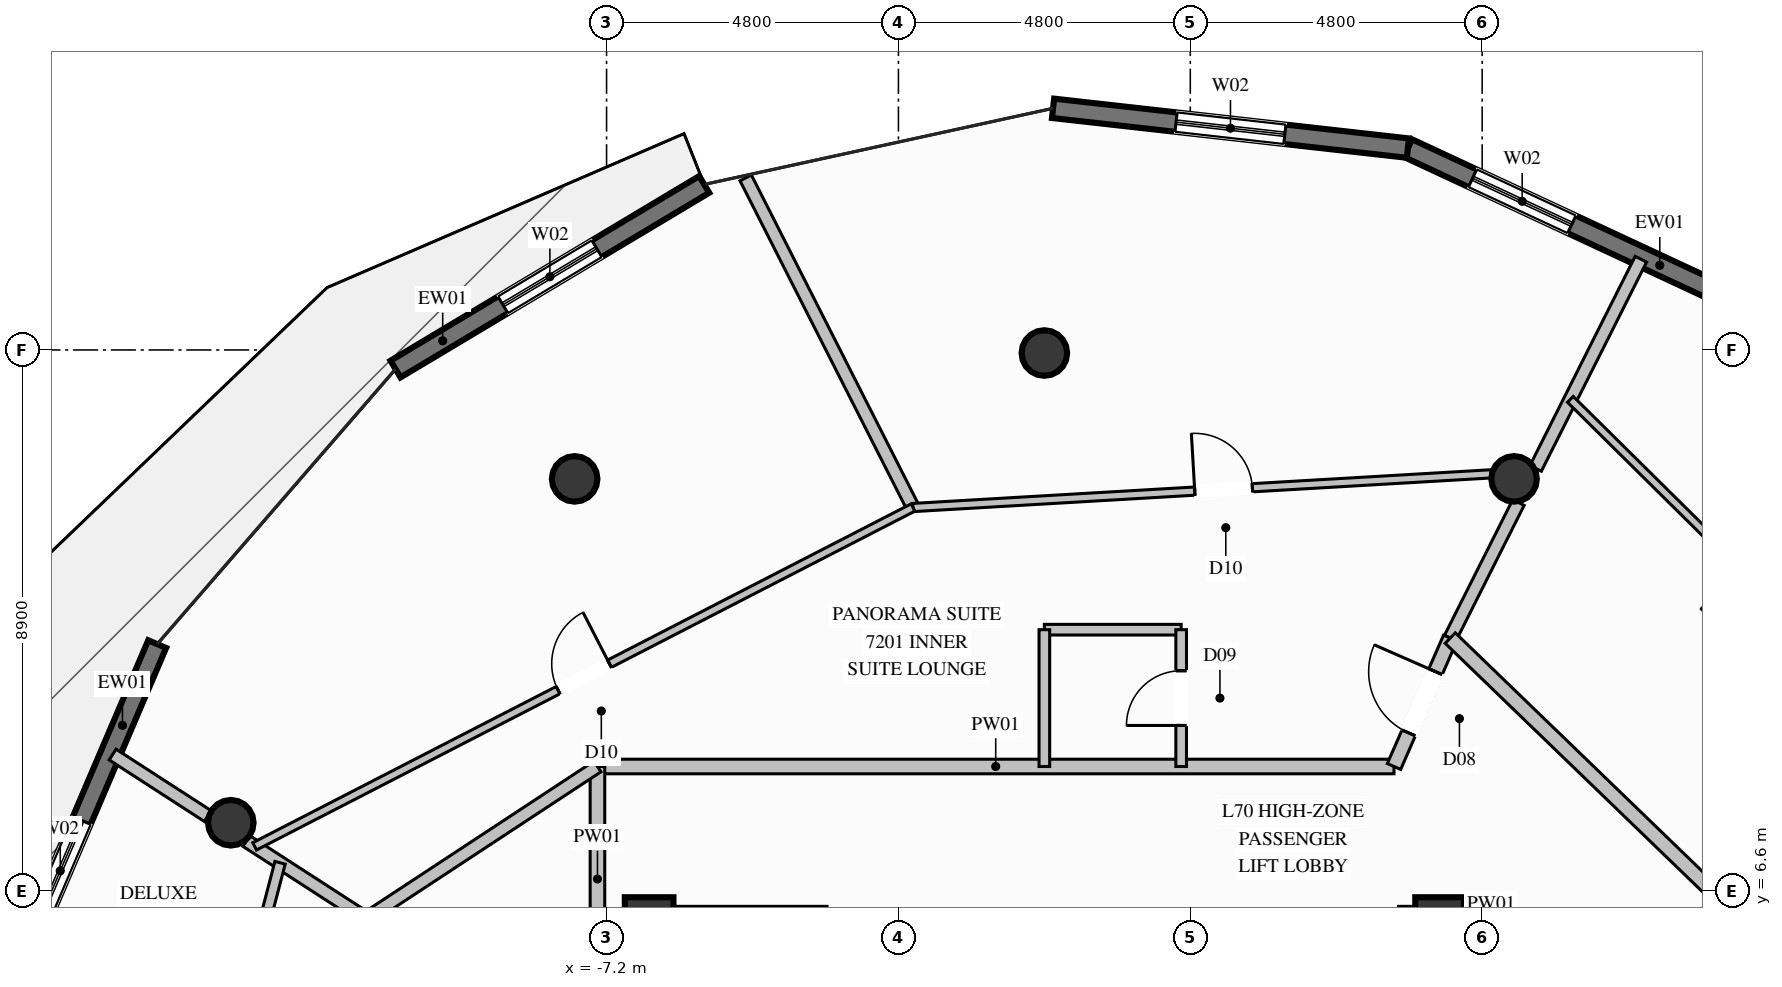
"""IFC4 building model, lengths in metres.
Left out: names, types, materials, properties, quantities, classifications, styles, units other than length and angle.
Written with IfcOpenShell. Run it as: python <this file> out.ifc"""

import sys

from ifc_helpers import new_model, si_unit, direction, frame, frame_2d, origin, origin_2d, place, context, subcontext, project, spatial, rectangle, circle, extrude, element, fill, save


model = new_model("IFC4")
c1 = context("Model", 3, precision=1e-05, world=origin(), true_north=direction((0.0, 1.0)))
c2 = subcontext(c1, "Body", "Model", "MODEL_VIEW")
j1 = project(units=[si_unit("LENGTHUNIT", "METRE"), si_unit("PLANEANGLEUNIT", "RADIAN")], contexts=[c1])
p1 = place(None, origin())
s1 = spatial("IfcSite", under=j1, at=p1, CompositionType="ELEMENT")
p2 = place(p1, origin())
s2 = spatial("IfcBuilding", under=s1, at=p2, CompositionType="ELEMENT")
p3 = place(p2, frame((0.0, 0.0, 270.6)))
s3 = spatial("IfcBuildingStorey", under=s2, at=p3, CompositionType="ELEMENT", Elevation=270.6)
for number, where, z_axis, x_axis in (
    (1, (6.5, 6.1, 0.0), (0.0, 0.0, 1.0), (1.0, 0.0, 0.0)),
    (2, (-6.5, 6.1, 0.0), (0.0, 0.0, 1.0), (1.0, 0.0, 0.0)),
):
    element("IfcColumn", number, at=place(p3, frame(where, z_axis=z_axis, x_axis=x_axis)), inside=s3, PredefinedType="COLUMN", context=c2, shape_type="SweptSolid", body=[
        extrude(rectangle(XDim=0.8, YDim=0.8, at=origin_2d()), origin(), (0.0, 0.0, 1.0), 3.8),
    ])
for number, where, z_axis, x_axis in (
    (3, (7.725, 13.38, 0.0), (0.0, 0.0, 1.0), (1.0, 0.0, 0.0)),
    (4, (0.0, 15.45, 0.0), (0.0, 0.0, 1.0), (1.0, 0.0, 0.0)),
    (5, (-7.725, 13.38, 0.0), (0.0, 0.0, 1.0), (1.0, 0.0, 0.0)),
    (6, (-13.38, 7.725, 0.0), (0.0, 0.0, 1.0), (1.0, 0.0, 0.0)),
):
    element("IfcColumn", number, at=place(p3, frame(where, z_axis=z_axis, x_axis=x_axis)), inside=s3, PredefinedType="COLUMN", context=c2, shape_type="SweptSolid", body=[
        extrude(circle(Radius=0.375, at=origin_2d()), origin(), (0.0, 0.0, 1.0), 3.8),
    ])
p4 = place(p3, frame((5.979, 18.82, 0.0), z_axis=(0.0, 0.0, 1.0), x_axis=(0.90661391217, -0.421961152548, 0.0)))
e7 = element("IfcWall", 7, at=p4, inside=s3, PredefinedType="SOLIDWALL", context=c2, shape_type="SweptSolid", body=[
    extrude(rectangle(XDim=5.916, YDim=0.32, at=frame_2d((2.958, 0.0))), origin(), (0.0, 0.0, 1.0), 3.57),
])
p5 = place(p4, frame((1.173, 0.0, 0.35)))
e8 = element("IfcOpeningElement", 8, at=p5, cuts=e7, PredefinedType="OPENING", context=c2, shape_type="SweptSolid", body=[
    extrude(rectangle(XDim=1.8, YDim=2.6, at=frame_2d((0.9, 1.3))), frame((0.0, 0.17, 0.0), z_axis=(0.0, -1.0, 0.0), x_axis=(1.0, 0.0, 0.0)), (0.0, 0.0, 1.0), 0.34),
])
p6 = place(p3, frame((0.143, 19.474, 0.0), z_axis=(0.0, 0.0, 1.0), x_axis=(0.993778337548, -0.111376010973, 0.0)))
e9 = element("IfcWall", 9, at=p6, inside=s3, PredefinedType="SOLIDWALL", context=c2, shape_type="SweptSolid", body=[
    extrude(rectangle(XDim=5.873, YDim=0.32, at=frame_2d((2.936, 0.0))), origin(), (0.0, 0.0, 1.0), 3.57),
])
p7 = place(p6, frame((2.036, 0.0, 0.35)))
e10 = element("IfcOpeningElement", 10, at=p7, cuts=e9, PredefinedType="OPENING", context=c2, shape_type="SweptSolid", body=[
    extrude(rectangle(XDim=1.8, YDim=2.6, at=frame_2d((0.9, 1.3))), frame((0.0, 0.17, 0.0), z_axis=(0.0, -1.0, 0.0), x_axis=(1.0, 0.0, 0.0)), (0.0, 0.0, 1.0), 0.34),
])
p8 = place(p3, frame((-10.671, 15.186, 0.0), z_axis=(0.0, 0.0, 1.0), x_axis=(0.858256729209, 0.513220602439, 0.0)))
e11 = element("IfcWall", 11, at=p8, inside=s3, PredefinedType="SOLIDWALL", context=c2, shape_type="SweptSolid", body=[
    extrude(rectangle(XDim=5.915, YDim=0.32, at=frame_2d((2.958, 0.0))), origin(), (0.0, 0.0, 1.0), 3.57),
])
p9 = place(p8, frame((2.058, 0.0, 0.35)))
e12 = element("IfcOpeningElement", 12, at=p9, cuts=e11, PredefinedType="OPENING", context=c2, shape_type="SweptSolid", body=[
    extrude(rectangle(XDim=1.8, YDim=2.6, at=frame_2d((0.9, 1.3))), frame((0.0, 0.17, 0.0), z_axis=(0.0, -1.0, 0.0), x_axis=(1.0, 0.0, 0.0)), (0.0, 0.0, 1.0), 0.34),
])
p10 = place(p3, frame((-16.97, 5.097, 0.0), z_axis=(0.0, 0.0, 1.0), x_axis=(0.392999104836, 0.919538853773, 0.0)))
e13 = element("IfcWall", 13, at=p10, inside=s3, PredefinedType="SOLIDWALL", context=c2, shape_type="SweptSolid", body=[
    extrude(rectangle(XDim=6.053, YDim=0.32, at=frame_2d((3.027, 0.0))), origin(), (0.0, 0.0, 1.0), 3.57),
])
p11 = place(p10, frame((1.098, 0.0, 0.35)))
e14 = element("IfcOpeningElement", 14, at=p11, cuts=e13, PredefinedType="OPENING", context=c2, shape_type="SweptSolid", body=[
    extrude(rectangle(XDim=1.8, YDim=2.6, at=frame_2d((0.9, 1.3))), frame((0.0, 0.17, 0.0), z_axis=(0.0, -1.0, 0.0), x_axis=(1.0, 0.0, 0.0)), (0.0, 0.0, 1.0), 0.34),
])
p12 = place(p3, frame((-7.35, 8.65, 0.0), z_axis=(0.0, 0.0, 1.0), x_axis=(1.0, 0.0, 0.0)))
e15 = element("IfcWall", 15, at=p12, inside=s3, PredefinedType="PARTITIONING", context=c2, shape_type="SweptSolid", body=[
    extrude(rectangle(XDim=13.1, YDim=0.24, at=frame_2d((6.55, 0.0))), origin(), (0.0, 0.0, 1.0), 3.57),
])
p13 = place(p3, frame((-7.35, 4.95, 0.0), z_axis=(0.0, 0.0, 1.0), x_axis=(0.0, 1.0, 0.0)))
e16 = element("IfcWall", 16, at=p13, inside=s3, PredefinedType="PARTITIONING", context=c2, shape_type="SweptSolid", body=[
    extrude(rectangle(XDim=3.7, YDim=0.24, at=frame_2d((1.85, 0.0))), origin(), (0.0, 0.0, 1.0), 2.655),
])
p14 = place(p3, frame((6.675, 10.762, 0.0), z_axis=(0.0, 0.0, 1.0), x_axis=(0.449481077606, 0.893289852665, 0.0)))
e17 = element("IfcWall", 17, at=p14, inside=s3, PredefinedType="PARTITIONING", context=c2, shape_type="SweptSolid", body=[
    extrude(rectangle(XDim=2.496, YDim=0.21, at=frame_2d((1.248, 0.0))), origin(), (0.0, 0.0, 1.0), 3.011),
])
p15 = place(p3, frame((8.08, 13.553, 0.0), z_axis=(0.0, 0.0, 1.0), x_axis=(0.449494481026, 0.893283108274, 0.0)))
e18 = element("IfcWall", 18, at=p15, inside=s3, PredefinedType="PARTITIONING", context=c2, shape_type="SweptSolid", body=[
    extrude(rectangle(XDim=3.851, YDim=0.21, at=frame_2d((1.925, 0.0))), origin(), (0.0, 0.0, 1.0), 3.57),
])
p16 = place(p3, frame((-11.152, 6.15, 0.0), z_axis=(0.0, 0.0, 1.0), x_axis=(-0.83972632371, 0.54300985375, 0.0)))
e19 = element("IfcWall", 19, at=p16, inside=s3, PredefinedType="PARTITIONING", context=c2, shape_type="SweptSolid", body=[
    extrude(rectangle(XDim=2.348, YDim=0.21, at=frame_2d((1.174, 0.0))), origin(), (0.0, 0.0, 1.0), 3.011),
])
p17 = place(p3, frame((-13.759, 7.835, 0.0), z_axis=(0.0, 0.0, 1.0), x_axis=(-0.83972828355, 0.543006822982, 0.0)))
e20 = element("IfcWall", 20, at=p17, inside=s3, PredefinedType="PARTITIONING", context=c2, shape_type="SweptSolid", body=[
    extrude(rectangle(XDim=1.864, YDim=0.21, at=frame_2d((0.932, 0.0))), origin(), (0.0, 0.0, 1.0), 3.57),
])
for number, where, z_axis, x_axis in (
    (21, (0.0, 10.9, 0.0), (0.0, 0.0, 1.0), (1.0, 0.0, 0.0)),
    (22, (0.0, 10.9, 0.0), (0.0, 0.0, 1.0), (0.0, -1.0, 0.0)),
):
    element("IfcWall", number, at=place(p3, frame(where, z_axis=z_axis, x_axis=x_axis)), inside=s3, PredefinedType="PLUMBINGWALL", context=c2, shape_type="SweptSolid", body=[
        extrude(rectangle(XDim=2.25, YDim=0.175, at=frame_2d((1.125, 0.0))), origin(), (0.0, 0.0, 1.0), 3.57),
    ])
p18 = place(p3, frame((2.25, 8.65, 0.0), z_axis=(0.0, 0.0, 1.0), x_axis=(0.0, 1.0, 0.0)))
e23 = element("IfcWall", 23, at=p18, inside=s3, PredefinedType="PLUMBINGWALL", context=c2, shape_type="SweptSolid", body=[
    extrude(rectangle(XDim=2.25, YDim=0.175, at=frame_2d((1.125, 0.0))), origin(), (0.0, 0.0, 1.0), 3.57),
])
p19 = place(p18, frame((0.675, 0.0, 0.0)))
e24 = element("IfcOpeningElement", 24, at=p19, cuts=e23, PredefinedType="OPENING", context=c2, shape_type="SweptSolid", body=[
    extrude(rectangle(XDim=0.9, YDim=2.1, at=frame_2d((0.45, 1.05))), frame((0.0, 0.098, 0.0), z_axis=(0.0, -1.0, 0.0), x_axis=(1.0, 0.0, 0.0)), (0.0, 0.0, 1.0), 0.195),
])
p20 = place(p3, frame((-11.152, 6.15, 0.0), z_axis=(0.0, 0.0, 1.0), x_axis=(0.835549960432, 0.549414473437, 0.0)))
e25 = element("IfcWall", 25, at=p20, inside=s3, PredefinedType="PARTITIONING", context=c2, shape_type="SweptSolid", body=[
    extrude(rectangle(XDim=4.55, YDim=0.21, at=frame_2d((2.275, 0.0))), origin(), (0.0, 0.0, 1.0), 3.57),
])
p21 = place(p3, frame((5.75, 8.65, 0.0), z_axis=(0.0, 0.0, 1.0), x_axis=(0.401190953907, 0.915994442398, 0.0)))
e26 = element("IfcWall", 26, at=p21, inside=s3, PredefinedType="PARTITIONING", context=c2, shape_type="SweptSolid", body=[
    extrude(rectangle(XDim=2.306, YDim=0.24, at=frame_2d((1.153, 0.0))), origin(), (0.0, 0.0, 1.0), 3.011),
])
p22 = place(p21, frame((0.603, 0.0, 0.0)))
e27 = element("IfcOpeningElement", 27, at=p22, cuts=e26, PredefinedType="OPENING", context=c2, shape_type="SweptSolid", body=[
    extrude(rectangle(XDim=1.1, YDim=2.3, at=frame_2d((0.55, 1.15))), frame((0.0, 0.13, 0.0), z_axis=(0.0, -1.0, 0.0), x_axis=(1.0, 0.0, 0.0)), (0.0, 0.0, 1.0), 0.26),
])
p23 = place(p3, frame((-2.161, 12.909, 0.0), z_axis=(0.0, 0.0, 1.0), x_axis=(-0.452554812293, 0.891736587715, 0.0)))
e28 = element("IfcWall", 28, at=p23, inside=s3, PredefinedType="PARTITIONING", context=c2, shape_type="SweptSolid", body=[
    extrude(rectangle(XDim=6.079, YDim=0.21, at=frame_2d((3.04, 0.0))), origin(), (0.0, 0.0, 1.0), 3.57),
])
p24 = place(p3, frame((-2.161, 12.909, 0.0), z_axis=(0.0, 0.0, 1.0), x_axis=(0.998308345871, 0.05814160785, 0.0)))
e29 = element("IfcWall", 29, at=p24, inside=s3, PredefinedType="PARTITIONING", context=c2, shape_type="SweptSolid", body=[
    extrude(rectangle(XDim=10.233, YDim=0.135, at=frame_2d((5.117, 0.0))), origin(), (0.0, 0.0, 1.0), 3.138),
])
p25 = place(p24, frame((4.642, 0.0, 0.0)))
e30 = element("IfcOpeningElement", 30, at=p25, cuts=e29, PredefinedType="OPENING", context=c2, shape_type="SweptSolid", body=[
    extrude(rectangle(XDim=0.95, YDim=2.1, at=frame_2d((0.475, 1.05))), frame((0.0, 0.078, 0.0), z_axis=(0.0, -1.0, 0.0), x_axis=(1.0, 0.0, 0.0)), (0.0, 0.0, 1.0), 0.155),
])
p26 = place(p3, frame((-12.988, 7.337, 0.0), z_axis=(0.0, 0.0, 1.0), x_axis=(0.889161723705, 0.457593082441, 0.0)))
e31 = element("IfcWall", 31, at=p26, inside=s3, PredefinedType="PARTITIONING", context=c2, shape_type="SweptSolid", body=[
    extrude(rectangle(XDim=12.177, YDim=0.135, at=frame_2d((6.088, 0.0))), origin(), (0.0, 0.0, 1.0), 3.138),
])
p27 = place(p26, frame((5.613, 0.0, 0.0)))
e32 = element("IfcOpeningElement", 32, at=p27, cuts=e31, PredefinedType="OPENING", context=c2, shape_type="SweptSolid", body=[
    extrude(rectangle(XDim=0.95, YDim=2.1, at=frame_2d((0.475, 1.05))), frame((0.0, 0.078, 0.0), z_axis=(0.0, -1.0, 0.0), x_axis=(1.0, 0.0, 0.0)), (0.0, 0.0, 1.0), 0.155),
])
p28 = place(p3, frame((-12.57, 7.067, 0.0), z_axis=(0.0, 0.0, 1.0), x_axis=(-0.25291700501, -0.967487978518, 0.0)))
e33 = element("IfcWall", 33, at=p28, inside=s3, PredefinedType="PLUMBINGWALL", context=c2, shape_type="SweptSolid", body=[
    extrude(rectangle(XDim=3.111, YDim=0.175, at=frame_2d((1.556, 0.0))), origin(), (0.0, 0.0, 1.0), 3.57),
])
p29 = place(p3, frame((11.452, 6.15, 0.0), z_axis=(0.0, 0.0, 1.0), x_axis=(-0.719407162497, 0.694588608133, 0.0)))
e34 = element("IfcWall", 34, at=p29, inside=s3, PredefinedType="PARTITIONING", context=c2, shape_type="SweptSolid", body=[
    extrude(rectangle(XDim=6.64, YDim=0.24, at=frame_2d((3.32, 0.0))), origin(), (0.0, 0.0, 1.0), 3.57),
])
p30 = place(p3, frame((14.948, 8.46, 0.0), z_axis=(0.0, 0.0, 1.0), x_axis=(-0.710996539207, 0.703195507121, 0.0)))
e35 = element("IfcWall", 35, at=p30, inside=s3, PredefinedType="PARTITIONING", context=c2, shape_type="SweptSolid", body=[
    extrude(rectangle(XDim=8.857, YDim=0.135, at=frame_2d((4.428, 0.0))), origin(), (0.0, 0.0, 1.0), 3.57),
])
p31 = place(p30, frame((3.953, 0.0, 0.0)))
e36 = element("IfcOpeningElement", 36, at=p31, cuts=e35, PredefinedType="OPENING", context=c2, shape_type="SweptSolid", body=[
    extrude(rectangle(XDim=0.95, YDim=2.1, at=frame_2d((0.475, 1.05))), frame((0.0, 0.078, 0.0), z_axis=(0.0, -1.0, 0.0), x_axis=(1.0, 0.0, 0.0)), (0.0, 0.0, 1.0), 0.155),
])
p32 = place(p5, origin())
e37 = element("IfcWindow", 37, at=p32, inside=s3, PartitioningType="SINGLE_PANEL", PredefinedType="WINDOW", context=c2, shape_type="SweptSolid", body=[
    extrude(rectangle(XDim=1.8, YDim=2.6, at=frame_2d((0.9, 1.3))), frame((0.0, 0.03, 0.0), z_axis=(0.0, -1.0, 0.0), x_axis=(1.0, 0.0, 0.0)), (0.0, 0.0, 1.0), 0.06),
])
fill(e8, e37)
p33 = place(p7, origin())
e38 = element("IfcWindow", 38, at=p33, inside=s3, PartitioningType="SINGLE_PANEL", PredefinedType="WINDOW", context=c2, shape_type="SweptSolid", body=[
    extrude(rectangle(XDim=1.8, YDim=2.6, at=frame_2d((0.9, 1.3))), frame((0.0, 0.03, 0.0), z_axis=(0.0, -1.0, 0.0), x_axis=(1.0, 0.0, 0.0)), (0.0, 0.0, 1.0), 0.06),
])
fill(e10, e38)
p34 = place(p9, origin())
e39 = element("IfcWindow", 39, at=p34, inside=s3, PartitioningType="SINGLE_PANEL", PredefinedType="WINDOW", context=c2, shape_type="SweptSolid", body=[
    extrude(rectangle(XDim=1.8, YDim=2.6, at=frame_2d((0.9, 1.3))), frame((0.0, 0.03, 0.0), z_axis=(0.0, -1.0, 0.0), x_axis=(1.0, 0.0, 0.0)), (0.0, 0.0, 1.0), 0.06),
])
fill(e12, e39)
p35 = place(p11, origin())
e40 = element("IfcWindow", 40, at=p35, inside=s3, PartitioningType="SINGLE_PANEL", PredefinedType="WINDOW", context=c2, shape_type="SweptSolid", body=[
    extrude(rectangle(XDim=1.8, YDim=2.6, at=frame_2d((0.9, 1.3))), frame((0.0, 0.03, 0.0), z_axis=(0.0, -1.0, 0.0), x_axis=(1.0, 0.0, 0.0)), (0.0, 0.0, 1.0), 0.06),
])
fill(e14, e40)
p36 = place(p19, origin())
e41 = element("IfcDoor", 41, at=p36, inside=s3, OperationType="SINGLE_SWING_LEFT", PredefinedType="DOOR", context=c2, shape_type="SweptSolid", body=[
    extrude(rectangle(XDim=0.9, YDim=2.1, at=frame_2d((0.45, 1.05))), frame((0.0, 0.025, 0.0), z_axis=(0.0, -1.0, 0.0), x_axis=(1.0, 0.0, 0.0)), (0.0, 0.0, 1.0), 0.05),
])
fill(e24, e41)
p37 = place(p22, origin())
e42 = element("IfcDoor", 42, at=p37, inside=s3, OperationType="SINGLE_SWING_RIGHT", PredefinedType="DOOR", context=c2, shape_type="SweptSolid", body=[
    extrude(rectangle(XDim=1.1, YDim=2.3, at=frame_2d((0.55, 1.15))), frame((0.0, 0.025, 0.0), z_axis=(0.0, -1.0, 0.0), x_axis=(1.0, 0.0, 0.0)), (0.0, 0.0, 1.0), 0.05),
])
fill(e27, e42)
p38 = place(p25, origin())
e43 = element("IfcDoor", 43, at=p38, inside=s3, OperationType="SINGLE_SWING_LEFT", PredefinedType="DOOR", context=c2, shape_type="SweptSolid", body=[
    extrude(rectangle(XDim=0.95, YDim=2.1, at=frame_2d((0.475, 1.05))), frame((0.0, 0.025, 0.0), z_axis=(0.0, -1.0, 0.0), x_axis=(1.0, 0.0, 0.0)), (0.0, 0.0, 1.0), 0.05),
])
fill(e30, e43)
p39 = place(p27, origin())
e44 = element("IfcDoor", 44, at=p39, inside=s3, OperationType="SINGLE_SWING_RIGHT", PredefinedType="DOOR", context=c2, shape_type="SweptSolid", body=[
    extrude(rectangle(XDim=0.95, YDim=2.1, at=frame_2d((0.475, 1.05))), frame((0.0, 0.025, 0.0), z_axis=(0.0, -1.0, 0.0), x_axis=(1.0, 0.0, 0.0)), (0.0, 0.0, 1.0), 0.05),
])
fill(e32, e44)
save(model, sys.argv[1])
